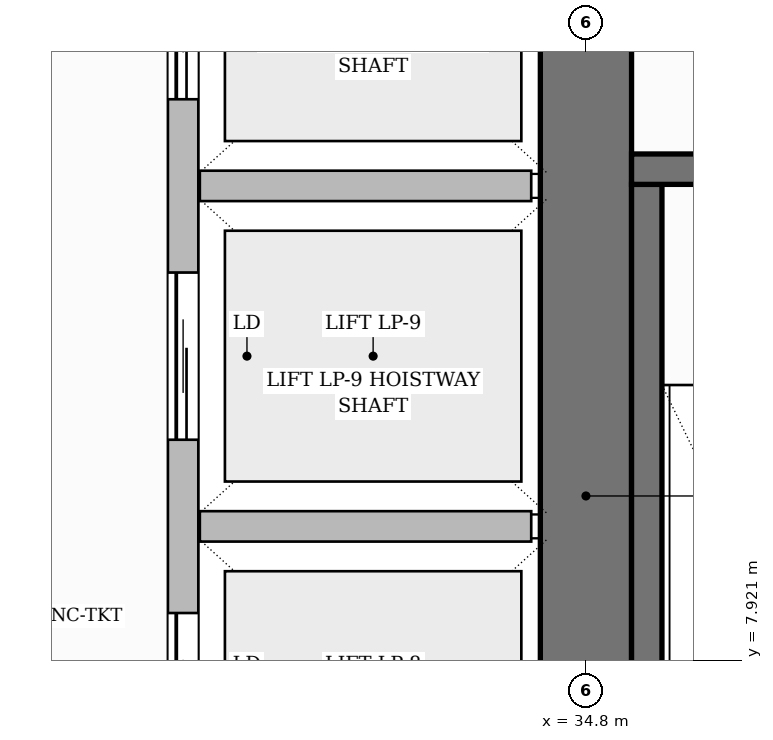
"""IFC4 building model, lengths in metres.
Left out: names, types, materials, properties, quantities, classifications, styles, units other than length and angle.
Written with IfcOpenShell. Run it as: python <this file> out.ifc"""

import sys

from ifc_helpers import new_model, si_unit, direction, frame, frame_2d, origin, place, context, subcontext, project, spatial, rectangle, extrude, source, transform, mapped, element, fill, save


model = new_model("IFC4")
c1 = context("Model", 3, precision=1e-05, world=origin(), true_north=direction((0.0, 1.0)))
c2 = subcontext(c1, "Body", "Model", "MODEL_VIEW")
j1 = project(units=[si_unit("LENGTHUNIT", "METRE"), si_unit("PLANEANGLEUNIT", "RADIAN")], contexts=[c1])
p1 = place(None, origin())
s1 = spatial("IfcSite", under=j1, at=p1, CompositionType="ELEMENT")
p2 = place(p1, origin())
s2 = spatial("IfcBuilding", under=s1, at=p2, CompositionType="ELEMENT")
p3 = place(p2, origin())
s3 = spatial("IfcBuildingStorey", under=s2, at=p3, CompositionType="ELEMENT", Elevation=0.0)
p4 = place(p3, frame((34.8, 3.9, 0.0), z_axis=(0.0, 0.0, 1.0), x_axis=(0.0, 1.0, 0.0)))
e1 = element("IfcWall", 1, at=p4, inside=s3, PredefinedType="SHEAR", context=c2, shape_type="SweptSolid", body=[
    extrude(rectangle(XDim=10.2, YDim=0.6, at=frame_2d((5.1, 0.0))), origin(), (0.0, 0.0, 1.0), 5.4),
])
p5 = place(p3, frame((35.2, 4.1, 0.0), z_axis=(0.0, 0.0, 1.0), x_axis=(0.0, 1.0, 0.0)))
e2 = element("IfcWall", 2, at=p5, inside=s3, PredefinedType="SHEAR", context=c2, shape_type="SweptSolid", body=[
    extrude(rectangle(XDim=6.95, YDim=0.2, at=frame_2d((3.475, 0.0))), origin(), (0.0, 0.0, 1.0), 5.4),
])
p6 = place(p3, frame((35.1, 11.15, 0.0), z_axis=(0.0, 0.0, 1.0), x_axis=(1.0, 0.0, 0.0)))
e3 = element("IfcWall", 3, at=p6, inside=s3, PredefinedType="SHEAR", context=c2, shape_type="SweptSolid", body=[
    extrude(rectangle(XDim=3.14, YDim=0.2, at=frame_2d((1.57, 0.0))), origin(), (0.0, 0.0, 1.0), 5.4),
])
p7 = place(p6, frame((1.045, 0.0, 0.0)))
e4 = element("IfcOpeningElement", 4, at=p7, cuts=e3, PredefinedType="OPENING", context=c2, shape_type="SweptSolid", body=[
    extrude(rectangle(XDim=1.05, YDim=2.2, at=frame_2d((0.525, 1.1))), frame((0.0, 0.11, 0.0), z_axis=(0.0, -1.0, 0.0), x_axis=(1.0, 0.0, 0.0)), (0.0, 0.0, 1.0), 0.22),
])
p8 = place(p3, frame((32.15, 4.39, 0.0), z_axis=(0.0, 0.0, 1.0), x_axis=(0.0, 1.0, 0.0)))
e5 = element("IfcWall", 5, at=p8, inside=s3, PredefinedType="PARTITIONING", context=c2, shape_type="SweptSolid", body=[
    extrude(rectangle(XDim=8.82, YDim=0.2, at=frame_2d((4.41, 0.0))), origin(), (0.0, 0.0, 1.0), 5.1),
])
p9 = place(p8, frame((0.5, 0.0, 0.0)))
e6 = element("IfcOpeningElement", 6, at=p9, cuts=e5, PredefinedType="OPENING", context=c2, shape_type="SweptSolid", body=[
    extrude(rectangle(XDim=1.1, YDim=2.2, at=frame_2d((0.55, 1.1))), frame((0.0, 0.11, 0.0), z_axis=(0.0, -1.0, 0.0), x_axis=(1.0, 0.0, 0.0)), (0.0, 0.0, 1.0), 0.22),
])
p10 = place(p8, frame((2.74, 0.0, 0.0)))
e7 = element("IfcOpeningElement", 7, at=p10, cuts=e5, PredefinedType="OPENING", context=c2, shape_type="SweptSolid", body=[
    extrude(rectangle(XDim=1.1, YDim=2.2, at=frame_2d((0.55, 1.1))), frame((0.0, 0.11, 0.0), z_axis=(0.0, -1.0, 0.0), x_axis=(1.0, 0.0, 0.0)), (0.0, 0.0, 1.0), 0.22),
])
p11 = place(p8, frame((4.98, 0.0, 0.0)))
e8 = element("IfcOpeningElement", 8, at=p11, cuts=e5, PredefinedType="OPENING", context=c2, shape_type="SweptSolid", body=[
    extrude(rectangle(XDim=1.1, YDim=2.2, at=frame_2d((0.55, 1.1))), frame((0.0, 0.11, 0.0), z_axis=(0.0, -1.0, 0.0), x_axis=(1.0, 0.0, 0.0)), (0.0, 0.0, 1.0), 0.22),
])
p12 = place(p8, frame((7.22, 0.0, 0.0)))
e9 = element("IfcOpeningElement", 9, at=p12, cuts=e5, PredefinedType="OPENING", context=c2, shape_type="SweptSolid", body=[
    extrude(rectangle(XDim=1.1, YDim=2.2, at=frame_2d((0.55, 1.1))), frame((0.0, 0.11, 0.0), z_axis=(0.0, -1.0, 0.0), x_axis=(1.0, 0.0, 0.0)), (0.0, 0.0, 1.0), 0.22),
])
for number, where, z_axis, x_axis in (
    (10, (32.26, 8.8, 0.0), (0.0, 0.0, 1.0), (1.0, 0.0, 0.0)),
    (11, (32.26, 11.04, 0.0), (0.0, 0.0, 1.0), (1.0, 0.0, 0.0)),
):
    element("IfcWall", number, at=place(p3, frame(where, z_axis=z_axis, x_axis=x_axis)), inside=s3, PredefinedType="PARTITIONING", context=c2, shape_type="SweptSolid", body=[
        extrude(rectangle(XDim=2.18, YDim=0.2, at=frame_2d((1.09, 0.0))), origin(), (0.0, 0.0, 1.0), 5.1),
    ])
m1 = source(origin(), c2, "Body", "SweptSolid", [
    extrude(rectangle(XDim=1.1, YDim=2.2, at=frame_2d((0.55, 1.1))), frame((0.0, 0.025, 0.0), z_axis=(0.0, -1.0, 0.0), x_axis=(1.0, 0.0, 0.0)), (0.0, 0.0, 1.0), 0.05),
])
p13 = place(p10, origin())
e12 = element("IfcDoor", 12, at=p13, inside=s3, OperationType="SLIDING_TO_LEFT", PredefinedType="DOOR", context=c2, shape_type="MappedRepresentation", body=[
    mapped(m1, transform((0.0, 0.0, 0.0), scale=1.0)),
])
fill(e7, e12)
p14 = place(p11, origin())
e13 = element("IfcDoor", 13, at=p14, inside=s3, OperationType="SLIDING_TO_LEFT", PredefinedType="DOOR", context=c2, shape_type="MappedRepresentation", body=[
    mapped(m1, transform((0.0, 0.0, 0.0), scale=1.0)),
])
fill(e8, e13)
p15 = place(p12, origin())
e14 = element("IfcDoor", 14, at=p15, inside=s3, OperationType="SLIDING_TO_LEFT", PredefinedType="DOOR", context=c2, shape_type="MappedRepresentation", body=[
    mapped(m1, transform((0.0, 0.0, 0.0), scale=1.0)),
])
fill(e9, e14)
save(model, sys.argv[1])
